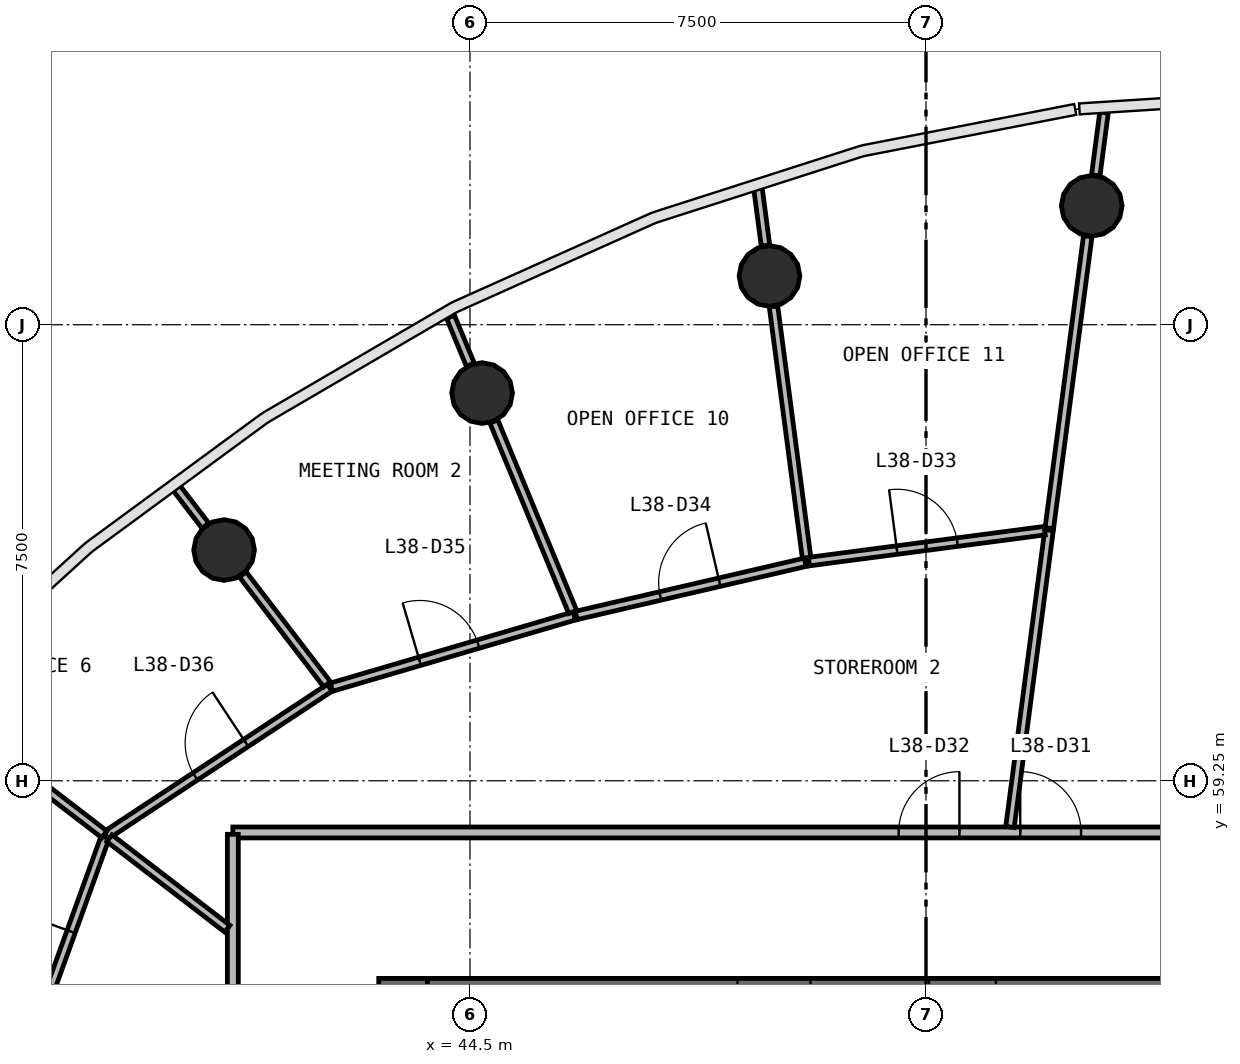
"""IFC4 building model, lengths in metres.
Left out: names, types, materials, properties, quantities, classifications, styles, units other than length and angle.
Written with IfcOpenShell. Run it as: python <this file> out.ifc"""

import sys

from ifc_helpers import new_model, si_unit, direction, frame, frame_2d, origin, origin_2d, place, context, subcontext, project, spatial, rectangle, circle, extrude, source, transform, mapped, element, fill, save


model = new_model("IFC4")
c1 = context("Model", 3, precision=1e-05, world=origin(), true_north=direction((0.0, 1.0)))
c2 = subcontext(c1, "Body", "Model", "MODEL_VIEW")
j1 = project(units=[si_unit("LENGTHUNIT", "METRE"), si_unit("PLANEANGLEUNIT", "RADIAN")], contexts=[c1])
p1 = place(None, origin())
s1 = spatial("IfcSite", under=j1, at=p1, CompositionType="ELEMENT")
p2 = place(p1, origin())
s2 = spatial("IfcBuilding", under=s1, at=p2, CompositionType="ELEMENT")
p3 = place(p2, frame((0.0, 0.0, 160.4)))
s3 = spatial("IfcBuildingStorey", under=s2, at=p3, CompositionType="ELEMENT", Elevation=160.4)
p4 = place(p3, frame((43.4, 56.0, 0.0), z_axis=(0.0, 0.0, 1.0), x_axis=(0.0, -1.0, 0.0)))
e1 = element("IfcWall", 1, at=p4, inside=s3, PredefinedType="SHEAR", context=c2, shape_type="SweptSolid", body=[
    extrude(rectangle(XDim=16.0, YDim=0.8, at=frame_2d((8.0, 0.0))), origin(), (0.0, 0.0, 1.0), 3.9),
])
p5 = place(p4, frame((7.1, 0.0, 0.0)))
e2 = element("IfcOpeningElement", 2, at=p5, cuts=e1, PredefinedType="OPENING", context=c2, shape_type="SweptSolid", body=[
    extrude(rectangle(XDim=1.8, YDim=2.1, at=frame_2d((0.9, 1.05))), frame((0.0, 0.41, 0.0), z_axis=(0.0, -1.0, 0.0), x_axis=(1.0, 0.0, 0.0)), (0.0, 0.0, 1.0), 0.82),
])
p6 = place(p3, frame((60.2, 55.6, 0.0), z_axis=(0.0, 0.0, 1.0), x_axis=(-1.0, 0.0, 0.0)))
e3 = element("IfcWall", 3, at=p6, inside=s3, PredefinedType="SHEAR", context=c2, shape_type="SweptSolid", body=[
    extrude(rectangle(XDim=16.4, YDim=0.8, at=frame_2d((8.2, 0.0))), origin(), (0.0, 0.0, 1.0), 3.9),
])
p7 = place(p6, frame((0.2, 0.0, 0.0)))
e4 = element("IfcOpeningElement", 4, at=p7, cuts=e3, PredefinedType="OPENING", context=c2, shape_type="SweptSolid", body=[
    extrude(rectangle(XDim=1.1, YDim=2.1, at=frame_2d((0.55, 1.05))), frame((0.0, 0.41, 0.0), z_axis=(0.0, -1.0, 0.0), x_axis=(1.0, 0.0, 0.0)), (0.0, 0.0, 1.0), 0.82),
])
p8 = place(p6, frame((10.1, 0.0, 0.0)))
e5 = element("IfcOpeningElement", 5, at=p8, cuts=e3, PredefinedType="OPENING", context=c2, shape_type="SweptSolid", body=[
    extrude(rectangle(XDim=1.2, YDim=2.1, at=frame_2d((0.6, 1.05))), frame((0.0, 0.41, 0.0), z_axis=(0.0, -1.0, 0.0), x_axis=(1.0, 0.0, 0.0)), (0.0, 0.0, 1.0), 0.82),
])
p9 = place(p6, frame((7.05, 0.0, 0.0)))
e6 = element("IfcOpeningElement", 6, at=p9, cuts=e3, PredefinedType="OPENING", context=c2, shape_type="SweptSolid", body=[
    extrude(rectangle(XDim=1.1, YDim=2.1, at=frame_2d((0.55, 1.05))), frame((0.0, 0.41, 0.0), z_axis=(0.0, -1.0, 0.0), x_axis=(1.0, 0.0, 0.0)), (0.0, 0.0, 1.0), 0.82),
])
m1 = source(origin(), c2, "Body", "SweptSolid", [
    extrude(circle(Radius=0.5, at=origin_2d()), origin(), (0.0, 0.0, 1.0), 3.9),
])
for number, where, z_axis, x_axis in (
    (7, (54.726, 68.705, 0.0), (0.0, 0.0, 1.0), (1.0, 0.0, 0.0)),
    (8, (49.426, 67.551, 0.0), (0.0, 0.0, 1.0), (1.0, 0.0, 0.0)),
    (9, (44.699, 65.626, 0.0), (0.0, 0.0, 1.0), (1.0, 0.0, 0.0)),
    (10, (40.456, 63.044, 0.0), (0.0, 0.0, 1.0), (1.0, 0.0, 0.0)),
):
    element("IfcColumn", number, at=place(p3, frame(where, z_axis=z_axis, x_axis=x_axis)), inside=s3, PredefinedType="COLUMN", context=c2, shape_type="MappedRepresentation", body=[
        mapped(m1, transform((0.0, 0.0, 0.0), scale=1.0)),
    ])
p10 = place(p3, frame((40.6, 58.4, 0.0), z_axis=(0.0, 0.0, 1.0), x_axis=(1.0, 0.0, 0.0)))
e11 = element("IfcWall", 11, at=p10, inside=s3, PredefinedType="PARTITIONING", context=c2, shape_type="SweptSolid", body=[
    extrude(rectangle(XDim=22.8, YDim=0.18, at=frame_2d((11.4, 0.0))), origin(), (0.0, 0.0, 1.0), 2.88),
])
p11 = place(p10, frame((12.95, 0.0, 0.0)))
e12 = element("IfcOpeningElement", 12, at=p11, cuts=e11, PredefinedType="OPENING", context=c2, shape_type="SweptSolid", body=[
    extrude(rectangle(XDim=1.0, YDim=2.1, at=frame_2d((0.5, 1.05))), frame((0.0, 0.1, 0.0), z_axis=(0.0, -1.0, 0.0), x_axis=(1.0, 0.0, 0.0)), (0.0, 0.0, 1.0), 0.2),
])
p12 = place(p10, frame((10.95, 0.0, 0.0)))
e13 = element("IfcOpeningElement", 13, at=p12, cuts=e11, PredefinedType="OPENING", context=c2, shape_type="SweptSolid", body=[
    extrude(rectangle(XDim=1.0, YDim=2.1, at=frame_2d((0.5, 1.05))), frame((0.0, 0.1, 0.0), z_axis=(0.0, -1.0, 0.0), x_axis=(1.0, 0.0, 0.0)), (0.0, 0.0, 1.0), 0.2),
])
p13 = place(p3, frame((40.6, 37.63, 0.0), z_axis=(0.0, 0.0, 1.0), x_axis=(0.0, 1.0, 0.0)))
e14 = element("IfcWall", 14, at=p13, inside=s3, PredefinedType="PARTITIONING", context=c2, shape_type="SweptSolid", body=[
    extrude(rectangle(XDim=20.74, YDim=0.18, at=frame_2d((10.37, 0.0))), origin(), (0.0, 0.0, 1.0), 2.88),
])
p14 = place(p13, frame((9.89, 0.0, 0.0)))
e15 = element("IfcOpeningElement", 15, at=p14, cuts=e14, PredefinedType="OPENING", context=c2, shape_type="SweptSolid", body=[
    extrude(rectangle(XDim=1.0, YDim=2.1, at=frame_2d((0.5, 1.05))), frame((0.0, 0.1, 0.0), z_axis=(0.0, -1.0, 0.0), x_axis=(1.0, 0.0, 0.0)), (0.0, 0.0, 1.0), 0.2),
])
p15 = place(p13, frame((4.29, 0.0, 0.0)))
e16 = element("IfcOpeningElement", 16, at=p15, cuts=e14, PredefinedType="OPENING", context=c2, shape_type="SweptSolid", body=[
    extrude(rectangle(XDim=1.0, YDim=2.1, at=frame_2d((0.5, 1.05))), frame((0.0, 0.1, 0.0), z_axis=(0.0, -1.0, 0.0), x_axis=(1.0, 0.0, 0.0)), (0.0, 0.0, 1.0), 0.2),
])
p16 = place(p3, frame((53.381, 58.49, 0.0), z_axis=(0.0, 0.0, 1.0), x_axis=(0.130523758186, 0.991445181817, 0.0)))
e17 = element("IfcWall", 17, at=p16, inside=s3, PredefinedType="PARTITIONING", context=c2, shape_type="SweptSolid", body=[
    extrude(rectangle(XDim=4.925, YDim=0.14, at=frame_2d((2.462, 0.0))), origin(), (0.0, 0.0, 1.0), 2.88),
])
p17 = place(p3, frame((54.028, 63.402, 0.0), z_axis=(0.0, 0.0, 1.0), x_axis=(0.130532734851, 0.991443999998, 0.0)))
e18 = element("IfcWall", 18, at=p17, inside=s3, PredefinedType="PARTITIONING", context=c2, shape_type="SweptSolid", body=[
    extrude(rectangle(XDim=4.844, YDim=0.14, at=frame_2d((2.422, 0.0))), origin(), (0.0, 0.0, 1.0), 2.88),
])
p18 = place(p3, frame((38.511, 58.351, 0.0), z_axis=(0.0, 0.0, 1.0), x_axis=(0.834612459485, 0.550837582662, 0.0)))
e19 = element("IfcWall", 19, at=p18, inside=s3, PredefinedType="PARTITIONING", context=c2, shape_type="SweptSolid", body=[
    extrude(rectangle(XDim=4.412, YDim=0.14, at=frame_2d((2.206, 0.0))), origin(), (0.0, 0.0, 1.0), 2.88),
])
p19 = place(p18, frame((1.762, 0.0, 0.0)))
e20 = element("IfcOpeningElement", 20, at=p19, cuts=e19, PredefinedType="OPENING", context=c2, shape_type="SweptSolid", body=[
    extrude(rectangle(XDim=1.0, YDim=2.1, at=frame_2d((0.5, 1.05))), frame((0.0, 0.08, 0.0), z_axis=(0.0, -1.0, 0.0), x_axis=(1.0, 0.0, 0.0)), (0.0, 0.0, 1.0), 0.16),
])
p20 = place(p3, frame((37.016, 54.207, 0.0), z_axis=(0.0, 0.0, 1.0), x_axis=(0.339349662801, 0.940660303381, 0.0)))
e21 = element("IfcWall", 21, at=p20, inside=s3, PredefinedType="PARTITIONING", context=c2, shape_type="SweptSolid", body=[
    extrude(rectangle(XDim=4.376, YDim=0.14, at=frame_2d((2.188, 0.0))), origin(), (0.0, 0.0, 1.0), 2.88),
])
p21 = place(p20, frame((1.725, 0.0, 0.0)))
e22 = element("IfcOpeningElement", 22, at=p21, cuts=e21, PredefinedType="OPENING", context=c2, shape_type="SweptSolid", body=[
    extrude(rectangle(XDim=1.0, YDim=2.1, at=frame_2d((0.5, 1.05))), frame((0.0, 0.08, 0.0), z_axis=(0.0, -1.0, 0.0), x_axis=(1.0, 0.0, 0.0)), (0.0, 0.0, 1.0), 0.16),
])
p22 = place(p3, frame((50.045, 62.85, 0.0), z_axis=(0.0, 0.0, 1.0), x_axis=(-0.130506679213, 0.991447430115, 0.0)))
e23 = element("IfcWall", 23, at=p22, inside=s3, PredefinedType="PARTITIONING", context=c2, shape_type="SweptSolid", body=[
    extrude(rectangle(XDim=4.237, YDim=0.14, at=frame_2d((2.119, 0.0))), origin(), (0.0, 0.0, 1.0), 2.88),
])
p23 = place(p3, frame((42.222, 60.789, 0.0), z_axis=(0.0, 0.0, 1.0), x_axis=(0.959559478974, 0.281505961415, 0.0)))
e24 = element("IfcWall", 24, at=p23, inside=s3, PredefinedType="PARTITIONING", context=c2, shape_type="SweptSolid", body=[
    extrude(rectangle(XDim=4.164, YDim=0.14, at=frame_2d((2.082, 0.0))), origin(), (0.0, 0.0, 1.0), 2.88),
])
p24 = place(p23, frame((1.514, 0.0, 0.0)))
e25 = element("IfcOpeningElement", 25, at=p24, cuts=e24, PredefinedType="OPENING", context=c2, shape_type="SweptSolid", body=[
    extrude(rectangle(XDim=1.0, YDim=2.1, at=frame_2d((0.5, 1.05))), frame((0.0, 0.08, 0.0), z_axis=(0.0, -1.0, 0.0), x_axis=(1.0, 0.0, 0.0)), (0.0, 0.0, 1.0), 0.16),
])
p25 = place(p3, frame((50.075, 62.854, 0.0), z_axis=(0.0, 0.0, 1.0), x_axis=(0.991491442794, 0.130171882012, 0.0)))
e26 = element("IfcWall", 26, at=p25, inside=s3, PredefinedType="PARTITIONING", context=c2, shape_type="SweptSolid", body=[
    extrude(rectangle(XDim=3.91, YDim=0.14, at=frame_2d((1.955, 0.0))), origin(), (0.0, 0.0, 1.0), 2.88),
])
p26 = place(p25, frame((1.461, 0.0, 0.0)))
e27 = element("IfcOpeningElement", 27, at=p26, cuts=e26, PredefinedType="OPENING", context=c2, shape_type="SweptSolid", body=[
    extrude(rectangle(XDim=1.0, YDim=2.1, at=frame_2d((0.5, 1.05))), frame((0.0, 0.08, 0.0), z_axis=(0.0, -1.0, 0.0), x_axis=(1.0, 0.0, 0.0)), (0.0, 0.0, 1.0), 0.16),
])
p27 = place(p3, frame((46.246, 61.968, 0.0), z_axis=(0.0, 0.0, 1.0), x_axis=(0.974087273118, 0.226172465941, 0.0)))
e28 = element("IfcWall", 28, at=p27, inside=s3, PredefinedType="PARTITIONING", context=c2, shape_type="SweptSolid", body=[
    extrude(rectangle(XDim=3.87, YDim=0.14, at=frame_2d((1.935, 0.0))), origin(), (0.0, 0.0, 1.0), 2.88),
])
p28 = place(p27, frame((1.42, 0.0, 0.0)))
e29 = element("IfcOpeningElement", 29, at=p28, cuts=e28, PredefinedType="OPENING", context=c2, shape_type="SweptSolid", body=[
    extrude(rectangle(XDim=1.0, YDim=2.1, at=frame_2d((0.5, 1.05))), frame((0.0, 0.08, 0.0), z_axis=(0.0, -1.0, 0.0), x_axis=(1.0, 0.0, 0.0)), (0.0, 0.0, 1.0), 0.16),
])
p29 = place(p3, frame((46.19, 62.027, 0.0), z_axis=(0.0, 0.0, 1.0), x_axis=(-0.382697308523, 0.923873784696, 0.0)))
e30 = element("IfcWall", 30, at=p29, inside=s3, PredefinedType="PARTITIONING", context=c2, shape_type="SweptSolid", body=[
    extrude(rectangle(XDim=3.391, YDim=0.14, at=frame_2d((1.695, 0.0))), origin(), (0.0, 0.0, 1.0), 2.88),
])
p30 = place(p3, frame((40.51, 56.817, 0.0), z_axis=(0.0, 0.0, 1.0), x_axis=(-0.793387804713, 0.608716511467, 0.0)))
e31 = element("IfcWall", 31, at=p30, inside=s3, PredefinedType="PARTITIONING", context=c2, shape_type="SweptSolid", body=[
    extrude(rectangle(XDim=2.446, YDim=0.14, at=frame_2d((1.223, 0.0))), origin(), (0.0, 0.0, 1.0), 2.88),
])
p31 = place(p3, frame((42.15, 60.836, 0.0), z_axis=(0.0, 0.0, 1.0), x_axis=(-0.608757629388, 0.793356255828, 0.0)))
e32 = element("IfcWall", 32, at=p31, inside=s3, PredefinedType="PARTITIONING", context=c2, shape_type="SweptSolid", body=[
    extrude(rectangle(XDim=2.279, YDim=0.14, at=frame_2d((1.139, 0.0))), origin(), (0.0, 0.0, 1.0), 2.88),
])
p32 = place(p3, frame((38.487, 58.369, 0.0), z_axis=(0.0, 0.0, 1.0), x_axis=(-0.793336842099, 0.608782929269, 0.0)))
e33 = element("IfcWall", 33, at=p32, inside=s3, PredefinedType="PARTITIONING", context=c2, shape_type="SweptSolid", body=[
    extrude(rectangle(XDim=1.794, YDim=0.14, at=frame_2d((0.897, 0.0))), origin(), (0.0, 0.0, 1.0), 2.88),
])
p33 = place(p3, frame((54.792, 69.205, 0.0), z_axis=(0.0, 0.0, 1.0), x_axis=(0.130569518357, 0.991439156417, 0.0)))
e34 = element("IfcWall", 34, at=p33, inside=s3, PredefinedType="PARTITIONING", context=c2, shape_type="SweptSolid", body=[
    extrude(rectangle(XDim=1.043, YDim=0.14, at=frame_2d((0.522, 0.0))), origin(), (0.0, 0.0, 1.0), 2.88),
])
p34 = place(p3, frame((49.36, 68.052, 0.0), z_axis=(0.0, 0.0, 1.0), x_axis=(-0.130434626054, 0.991456911987, 0.0)))
e35 = element("IfcWall", 35, at=p34, inside=s3, PredefinedType="PARTITIONING", context=c2, shape_type="SweptSolid", body=[
    extrude(rectangle(XDim=0.953, YDim=0.14, at=frame_2d((0.476, 0.0))), origin(), (0.0, 0.0, 1.0), 2.88),
])
p35 = place(p3, frame((44.506, 66.092, 0.0), z_axis=(0.0, 0.0, 1.0), x_axis=(-0.382722863119, 0.923863198772, 0.0)))
e36 = element("IfcWall", 36, at=p35, inside=s3, PredefinedType="PARTITIONING", context=c2, shape_type="SweptSolid", body=[
    extrude(rectangle(XDim=0.852, YDim=0.14, at=frame_2d((0.426, 0.0))), origin(), (0.0, 0.0, 1.0), 2.88),
])
p36 = place(p3, frame((40.149, 63.445, 0.0), z_axis=(0.0, 0.0, 1.0), x_axis=(-0.608659697441, 0.793431391307, 0.0)))
e37 = element("IfcWall", 37, at=p36, inside=s3, PredefinedType="PARTITIONING", context=c2, shape_type="SweptSolid", body=[
    extrude(rectangle(XDim=0.786, YDim=0.14, at=frame_2d((0.393, 0.0))), origin(), (0.0, 0.0, 1.0), 2.88),
])
m2 = source(origin(), c2, "Body", "SweptSolid", [
    extrude(rectangle(XDim=1.0, YDim=2.1, at=frame_2d((0.5, 1.05))), frame((0.0, 0.025, 0.0), z_axis=(0.0, -1.0, 0.0), x_axis=(1.0, 0.0, 0.0)), (0.0, 0.0, 1.0), 0.05),
])
p37 = place(p11, origin())
e38 = element("IfcDoor", 38, at=p37, inside=s3, OperationType="SINGLE_SWING_LEFT", PredefinedType="DOOR", context=c2, shape_type="MappedRepresentation", body=[
    mapped(m2, transform((0.0, 0.0, 0.0), scale=1.0)),
])
fill(e12, e38)
p38 = place(p12, origin())
e39 = element("IfcDoor", 39, at=p38, inside=s3, OperationType="SINGLE_SWING_RIGHT", PredefinedType="DOOR", context=c2, shape_type="MappedRepresentation", body=[
    mapped(m2, transform((0.0, 0.0, 0.0), scale=1.0)),
])
fill(e13, e39)
p39 = place(p26, origin())
e40 = element("IfcDoor", 40, at=p39, inside=s3, OperationType="SINGLE_SWING_LEFT", PredefinedType="DOOR", context=c2, shape_type="MappedRepresentation", body=[
    mapped(m2, transform((0.0, 0.0, 0.0), scale=1.0)),
])
fill(e27, e40)
p40 = place(p28, origin())
e41 = element("IfcDoor", 41, at=p40, inside=s3, OperationType="SINGLE_SWING_RIGHT", PredefinedType="DOOR", context=c2, shape_type="MappedRepresentation", body=[
    mapped(m2, transform((0.0, 0.0, 0.0), scale=1.0)),
])
fill(e29, e41)
p41 = place(p24, origin())
e42 = element("IfcDoor", 42, at=p41, inside=s3, OperationType="SINGLE_SWING_LEFT", PredefinedType="DOOR", context=c2, shape_type="MappedRepresentation", body=[
    mapped(m2, transform((0.0, 0.0, 0.0), scale=1.0)),
])
fill(e25, e42)
p42 = place(p19, origin())
e43 = element("IfcDoor", 43, at=p42, inside=s3, OperationType="SINGLE_SWING_RIGHT", PredefinedType="DOOR", context=c2, shape_type="MappedRepresentation", body=[
    mapped(m2, transform((0.0, 0.0, 0.0), scale=1.0)),
])
fill(e20, e43)
p43 = place(p21, origin())
e44 = element("IfcDoor", 44, at=p43, inside=s3, OperationType="SINGLE_SWING_RIGHT", PredefinedType="DOOR", context=c2, shape_type="MappedRepresentation", body=[
    mapped(m2, transform((0.0, 0.0, 0.0), scale=1.0)),
])
fill(e22, e44)
save(model, sys.argv[1])
